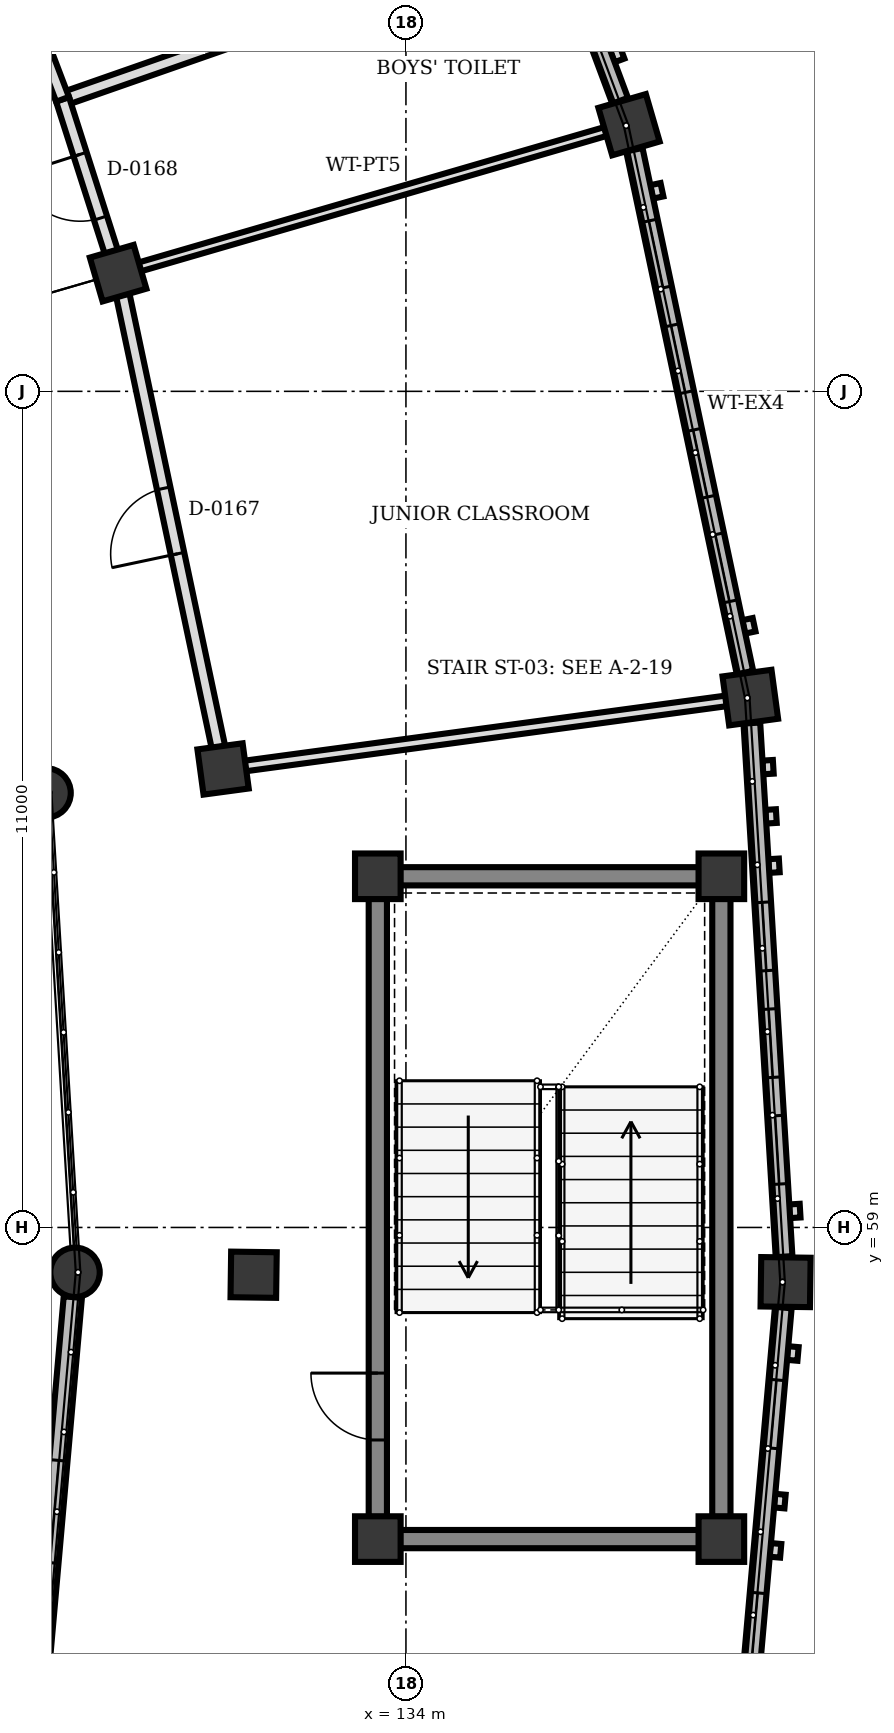
"""IFC4 building model, lengths in metres.
Left out: names, types, materials, properties, quantities, classifications, styles, units other than length and angle.
Written with IfcOpenShell. Run it as: python <this file> out.ifc"""

import sys

from ifc_helpers import new_model, si_unit, direction, frame, frame_2d, origin, origin_2d, place, context, subcontext, project, spatial, rectangle, circle, extrude, element, fill, save


model = new_model("IFC4")
c1 = context("Model", 3, precision=1e-05, world=origin(), true_north=direction((0.0, 1.0)))
c2 = subcontext(c1, "Body", "Model", "MODEL_VIEW")
j1 = project(units=[si_unit("LENGTHUNIT", "METRE"), si_unit("PLANEANGLEUNIT", "RADIAN")], contexts=[c1])
p1 = place(None, origin())
s1 = spatial("IfcSite", under=j1, at=p1, CompositionType="ELEMENT")
p2 = place(p1, origin())
s2 = spatial("IfcBuilding", under=s1, at=p2, CompositionType="ELEMENT")
p3 = place(p2, frame((0.0, 0.0, 4.5)))
s3 = spatial("IfcBuildingStorey", under=s2, at=p3, CompositionType="ELEMENT", Elevation=4.5)
for number, where, z_axis, x_axis in (
    (1, (133.63, 54.9, 0.0), (0.0, 0.0, 1.0), (1.0, 0.0, 0.0)),
    (2, (138.15, 54.9, 0.0), (0.0, 0.0, 1.0), (1.0, 0.0, 0.0)),
    (3, (138.15, 63.62, 0.0), (0.0, 0.0, 1.0), (1.0, 0.0, 0.0)),
    (4, (133.63, 63.62, 0.0), (0.0, 0.0, 1.0), (1.0, 0.0, 0.0)),
):
    element("IfcColumn", number, at=place(p3, frame(where, z_axis=z_axis, x_axis=x_axis)), inside=s3, PredefinedType="COLUMN", context=c2, shape_type="SweptSolid", body=[
        extrude(rectangle(XDim=0.6, YDim=0.6, at=origin_2d()), origin(), (0.0, 0.0, 1.0), 4.0),
    ])
for number, where, z_axis, x_axis in (
    (5, (129.646, 58.41, 0.0), (0.0, 0.0, 1.0), (1.0, 0.0, 0.0)),
    (6, (129.265, 64.717, 0.0), (0.0, 0.0, 1.0), (1.0, 0.0, 0.0)),
):
    element("IfcColumn", number, at=place(p3, frame(where, z_axis=z_axis, x_axis=x_axis)), inside=s3, PredefinedType="COLUMN", context=c2, shape_type="SweptSolid", body=[
        extrude(circle(Radius=0.325, at=origin_2d()), origin(), (0.0, 0.0, 1.0), 5.12),
    ])
for number, where, z_axis, x_axis in (
    (7, (131.996, 58.378, 0.0), (0.0, 0.0, 1.0), (1.0, -0.014, 0.0)),
    (8, (131.594, 65.032, 0.0), (0.0, 0.0, 1.0), (0.991, 0.134, 0.0)),
    (9, (130.213, 71.555, 0.0), (0.0, 0.0, 1.0), (0.96, 0.279, 0.0)),
):
    element("IfcColumn", number, at=place(p3, frame(where, z_axis=z_axis, x_axis=x_axis)), inside=s3, PredefinedType="COLUMN", context=c2, shape_type="SweptSolid", body=[
        extrude(rectangle(XDim=0.6, YDim=0.6, at=origin_2d()), origin(), (0.0, 0.0, 1.0), 4.0),
    ])
for number, where, z_axis, x_axis in (
    (10, (138.995, 58.281, 0.0), (0.0, 0.0, 1.0), (1.0, -0.014, 0.0)),
    (11, (138.531, 65.971, 0.0), (0.0, 0.0, 1.0), (0.991, 0.134, 0.0)),
    (12, (136.935, 73.508, 0.0), (0.0, 0.0, 1.0), (0.96, 0.279, 0.0)),
):
    element("IfcColumn", number, at=place(p3, frame(where, z_axis=z_axis, x_axis=x_axis)), inside=s3, PredefinedType="COLUMN", context=c2, shape_type="SweptSolid", body=[
        extrude(rectangle(XDim=0.65, YDim=0.65, at=origin_2d()), origin(), (0.0, 0.0, 1.0), 4.0),
    ])
p4 = place(p3, frame((138.965, 57.946, 0.0), z_axis=(0.0, 0.0, 1.0), x_axis=(-0.087777274836, -0.996140125696, 0.0)))
e13 = element("IfcWall", 13, at=p4, inside=s3, PredefinedType="SOLIDWALL", context=c2, shape_type="SweptSolid", body=[
    extrude(rectangle(XDim=7.031, YDim=0.22, at=frame_2d((3.516, 0.0))), origin(), (0.0, 0.0, 1.0), 3.172),
])
p5 = place(p4, frame((0.956, 0.0, 0.85)))
e14 = element("IfcOpeningElement", 14, at=p5, cuts=e13, PredefinedType="OPENING", context=c2, shape_type="SweptSolid", body=[
    extrude(rectangle(XDim=0.9, YDim=1.4, at=frame_2d((0.45, 0.7))), frame((0.0, 0.12, 0.0), z_axis=(0.0, -1.0, 0.0), x_axis=(1.0, 0.0, 0.0)), (0.0, 0.0, 1.0), 0.24),
])
p6 = place(p4, frame((3.769, 0.0, 0.85)))
e15 = element("IfcOpeningElement", 15, at=p6, cuts=e13, PredefinedType="OPENING", context=c2, shape_type="SweptSolid", body=[
    extrude(rectangle(XDim=0.9, YDim=1.4, at=frame_2d((0.45, 0.7))), frame((0.0, 0.12, 0.0), z_axis=(0.0, -1.0, 0.0), x_axis=(1.0, 0.0, 0.0)), (0.0, 0.0, 1.0), 0.24),
])
p7 = place(p4, frame((5.175, 0.0, 0.85)))
e16 = element("IfcOpeningElement", 16, at=p7, cuts=e13, PredefinedType="OPENING", context=c2, shape_type="SweptSolid", body=[
    extrude(rectangle(XDim=0.9, YDim=1.4, at=frame_2d((0.45, 0.7))), frame((0.0, 0.12, 0.0), z_axis=(0.0, -1.0, 0.0), x_axis=(1.0, 0.0, 0.0)), (0.0, 0.0, 1.0), 0.24),
])
p8 = place(p3, frame((129.12, 52.442, 0.0), z_axis=(0.0, 0.0, 1.0), x_axis=(0.087717690898, 0.996145374282, 0.0)))
e17 = element("IfcWall", 17, at=p8, inside=s3, PredefinedType="SOLIDWALL", context=c2, shape_type="SweptSolid", body=[
    extrude(rectangle(XDim=5.664, YDim=0.24, at=frame_2d((2.832, 0.0))), origin(), (0.0, 0.0, 1.0), 3.55),
])
p9 = place(p8, frame((2.157, 0.0, 0.9)))
e18 = element("IfcOpeningElement", 18, at=p9, cuts=e17, PredefinedType="OPENING", context=c2, shape_type="SweptSolid", body=[
    extrude(rectangle(XDim=1.35, YDim=1.7, at=frame_2d((0.675, 0.85))), frame((0.0, 0.13, 0.0), z_axis=(0.0, -1.0, 0.0), x_axis=(1.0, 0.0, 0.0)), (0.0, 0.0, 1.0), 0.26),
])
p10 = place(p3, frame((138.551, 65.636, 0.0), z_axis=(0.0, 0.0, 1.0), x_axis=(0.06029906372, -0.998180355905, 0.0)))
e19 = element("IfcWall", 19, at=p10, inside=s3, PredefinedType="SOLIDWALL", context=c2, shape_type="SweptSolid", body=[
    extrude(rectangle(XDim=7.033, YDim=0.22, at=frame_2d((3.516, 0.0))), origin(), (0.0, 0.0, 1.0), 3.172),
])
p11 = place(p10, frame((2.363, 0.0, 0.85)))
e20 = element("IfcOpeningElement", 20, at=p11, cuts=e19, PredefinedType="OPENING", context=c2, shape_type="SweptSolid", body=[
    extrude(rectangle(XDim=0.9, YDim=1.4, at=frame_2d((0.45, 0.7))), frame((0.0, 0.12, 0.0), z_axis=(0.0, -1.0, 0.0), x_axis=(1.0, 0.0, 0.0)), (0.0, 0.0, 1.0), 0.24),
])
p12 = place(p10, frame((3.77, 0.0, 0.85)))
e21 = element("IfcOpeningElement", 21, at=p12, cuts=e19, PredefinedType="OPENING", context=c2, shape_type="SweptSolid", body=[
    extrude(rectangle(XDim=0.9, YDim=1.4, at=frame_2d((0.45, 0.7))), frame((0.0, 0.12, 0.0), z_axis=(0.0, -1.0, 0.0), x_axis=(1.0, 0.0, 0.0)), (0.0, 0.0, 1.0), 0.24),
])
p13 = place(p10, frame((5.176, 0.0, 0.85)))
e22 = element("IfcOpeningElement", 22, at=p13, cuts=e19, PredefinedType="OPENING", context=c2, shape_type="SweptSolid", body=[
    extrude(rectangle(XDim=0.9, YDim=1.4, at=frame_2d((0.45, 0.7))), frame((0.0, 0.12, 0.0), z_axis=(0.0, -1.0, 0.0), x_axis=(1.0, 0.0, 0.0)), (0.0, 0.0, 1.0), 0.24),
])
p14 = place(p3, frame((137.005, 73.179, 0.0), z_axis=(0.0, 0.0, 1.0), x_axis=(0.207081302077, -0.978323736976, 0.0)))
e23 = element("IfcWall", 23, at=p14, inside=s3, PredefinedType="SOLIDWALL", context=c2, shape_type="SweptSolid", body=[
    extrude(rectangle(XDim=7.031, YDim=0.22, at=frame_2d((3.516, 0.0))), origin(), (0.0, 0.0, 1.0), 3.172),
])
p15 = place(p14, frame((0.956, 0.0, 0.85)))
e24 = element("IfcOpeningElement", 24, at=p15, cuts=e23, PredefinedType="OPENING", context=c2, shape_type="SweptSolid", body=[
    extrude(rectangle(XDim=0.9, YDim=1.4, at=frame_2d((0.45, 0.7))), frame((0.0, 0.12, 0.0), z_axis=(0.0, -1.0, 0.0), x_axis=(1.0, 0.0, 0.0)), (0.0, 0.0, 1.0), 0.24),
])
p16 = place(p14, frame((2.363, 0.0, 0.85)))
e25 = element("IfcOpeningElement", 25, at=p16, cuts=e23, PredefinedType="OPENING", context=c2, shape_type="SweptSolid", body=[
    extrude(rectangle(XDim=0.9, YDim=1.4, at=frame_2d((0.45, 0.7))), frame((0.0, 0.12, 0.0), z_axis=(0.0, -1.0, 0.0), x_axis=(1.0, 0.0, 0.0)), (0.0, 0.0, 1.0), 0.24),
])
p17 = place(p14, frame((3.769, 0.0, 0.85)))
e26 = element("IfcOpeningElement", 26, at=p17, cuts=e23, PredefinedType="OPENING", context=c2, shape_type="SweptSolid", body=[
    extrude(rectangle(XDim=0.9, YDim=1.4, at=frame_2d((0.45, 0.7))), frame((0.0, 0.12, 0.0), z_axis=(0.0, -1.0, 0.0), x_axis=(1.0, 0.0, 0.0)), (0.0, 0.0, 1.0), 0.24),
])
p18 = place(p14, frame((5.175, 0.0, 0.85)))
e27 = element("IfcOpeningElement", 27, at=p18, cuts=e23, PredefinedType="OPENING", context=c2, shape_type="SweptSolid", body=[
    extrude(rectangle(XDim=0.9, YDim=1.4, at=frame_2d((0.45, 0.7))), frame((0.0, 0.12, 0.0), z_axis=(0.0, -1.0, 0.0), x_axis=(1.0, 0.0, 0.0)), (0.0, 0.0, 1.0), 0.24),
])
p19 = place(p3, frame((134.361, 80.411, 0.0), z_axis=(0.0, 0.0, 1.0), x_axis=(0.349448583385, -0.936955541939, 0.0)))
e28 = element("IfcWall", 28, at=p19, inside=s3, PredefinedType="SOLIDWALL", context=c2, shape_type="SweptSolid", body=[
    extrude(rectangle(XDim=7.031, YDim=0.22, at=frame_2d((3.516, 0.0))), origin(), (0.0, 0.0, 1.0), 3.172),
])
p20 = place(p19, frame((0.584, 0.0, 1.15)))
e29 = element("IfcOpeningElement", 29, at=p20, cuts=e28, PredefinedType="OPENING", context=c2, shape_type="SweptSolid", body=[
    extrude(rectangle(XDim=0.8, YDim=1.1, at=frame_2d((0.4, 0.55))), frame((0.0, 0.12, 0.0), z_axis=(0.0, -1.0, 0.0), x_axis=(1.0, 0.0, 0.0)), (0.0, 0.0, 1.0), 0.24),
])
p21 = place(p19, frame((2.834, 0.0, 1.15)))
e30 = element("IfcOpeningElement", 30, at=p21, cuts=e28, PredefinedType="OPENING", context=c2, shape_type="SweptSolid", body=[
    extrude(rectangle(XDim=0.8, YDim=1.1, at=frame_2d((0.4, 0.55))), frame((0.0, 0.12, 0.0), z_axis=(0.0, -1.0, 0.0), x_axis=(1.0, 0.0, 0.0)), (0.0, 0.0, 1.0), 0.24),
])
p22 = place(p19, frame((5.366, 0.0, 1.15)))
e31 = element("IfcOpeningElement", 31, at=p22, cuts=e28, PredefinedType="OPENING", context=c2, shape_type="SweptSolid", body=[
    extrude(rectangle(XDim=0.8, YDim=1.1, at=frame_2d((0.4, 0.55))), frame((0.0, 0.12, 0.0), z_axis=(0.0, -1.0, 0.0), x_axis=(1.0, 0.0, 0.0)), (0.0, 0.0, 1.0), 0.24),
])
p23 = place(p3, frame((133.63, 55.192, 0.0), z_axis=(0.0, 0.0, 1.0), x_axis=(0.0, 1.0, 0.0)))
e32 = element("IfcWall", 32, at=p23, inside=s3, PredefinedType="SHEAR", context=c2, shape_type="SweptSolid", body=[
    extrude(rectangle(XDim=8.136, YDim=0.24, at=frame_2d((4.068, 0.0))), origin(), (0.0, 0.0, 1.0), 3.74),
])
p24 = place(p23, frame((1.012, 0.0, 0.0)))
e33 = element("IfcOpeningElement", 33, at=p24, cuts=e32, PredefinedType="OPENING", context=c2, shape_type="SweptSolid", body=[
    extrude(rectangle(XDim=0.88, YDim=2.1, at=frame_2d((0.44, 1.05))), frame((0.0, 0.13, 0.0), z_axis=(0.0, -1.0, 0.0), x_axis=(1.0, 0.0, 0.0)), (0.0, 0.0, 1.0), 0.26),
])
p25 = place(p3, frame((138.15, 63.328, 0.0), z_axis=(0.0, 0.0, 1.0), x_axis=(0.0, -1.0, 0.0)))
e34 = element("IfcWall", 34, at=p25, inside=s3, PredefinedType="SHEAR", context=c2, shape_type="SweptSolid", body=[
    extrude(rectangle(XDim=8.136, YDim=0.24, at=frame_2d((4.068, 0.0))), origin(), (0.0, 0.0, 1.0), 3.74),
])
for number, where, z_axis, x_axis in (
    (35, (137.858, 54.9, 0.0), (0.0, 0.0, 1.0), (-1.0, 0.0, 0.0)),
    (36, (137.858, 63.62, 0.0), (0.0, 0.0, 1.0), (-1.0, 0.0, 0.0)),
):
    element("IfcWall", number, at=place(p3, frame(where, z_axis=z_axis, x_axis=x_axis)), inside=s3, PredefinedType="SHEAR", context=c2, shape_type="SweptSolid", body=[
        extrude(rectangle(XDim=3.936, YDim=0.24, at=frame_2d((1.968, 0.0))), origin(), (0.0, 0.0, 1.0), 3.74),
    ])
p26 = place(p3, frame((131.883, 65.071, 0.0), z_axis=(0.0, 0.0, 1.0), x_axis=(0.990971868219, 0.134069968295, 0.0)))
e37 = element("IfcWall", 37, at=p26, inside=s3, PredefinedType="PARTITIONING", context=c2, shape_type="SweptSolid", body=[
    extrude(rectangle(XDim=6.392, YDim=0.14, at=frame_2d((3.196, 0.0))), origin(), (0.0, 0.0, 1.0), 3.072),
])
p27 = place(p3, frame((130.493, 71.636, 0.0), z_axis=(0.0, 0.0, 1.0), x_axis=(0.960267345013, 0.279081755231, 0.0)))
e38 = element("IfcWall", 38, at=p27, inside=s3, PredefinedType="PARTITIONING", context=c2, shape_type="SweptSolid", body=[
    extrude(rectangle(XDim=6.392, YDim=0.12, at=frame_2d((3.196, 0.0))), origin(), (0.0, 0.0, 1.0), 3.072),
])
p28 = place(p3, frame((129.482, 73.842, 0.0), z_axis=(0.0, 0.0, 1.0), x_axis=(0.944038525113, 0.329835205979, 0.0)))
e39 = element("IfcWall", 39, at=p28, inside=s3, PredefinedType="PARTITIONING", context=c2, shape_type="SweptSolid", body=[
    extrude(rectangle(XDim=6.755, YDim=0.18, at=frame_2d((3.377, 0.0))), origin(), (0.0, 0.0, 1.0), 3.072),
])
p29 = place(p3, frame((131.533, 65.318, 0.0), z_axis=(0.0, 0.0, 1.0), x_axis=(-0.206987404473, 0.978343607527, 0.0)))
e40 = element("IfcWall", 40, at=p29, inside=s3, PredefinedType="PARTITIONING", context=c2, shape_type="SweptSolid", body=[
    extrude(rectangle(XDim=6.083, YDim=0.18, at=frame_2d((3.042, 0.0))), origin(), (0.0, 0.0, 1.0), 3.072),
])
p30 = place(p29, frame((2.601, 0.0, 0.0)))
e41 = element("IfcOpeningElement", 41, at=p30, cuts=e40, PredefinedType="OPENING", context=c2, shape_type="SweptSolid", body=[
    extrude(rectangle(XDim=0.88, YDim=2.1, at=frame_2d((0.44, 1.05))), frame((0.0, 0.1, 0.0), z_axis=(0.0, -1.0, 0.0), x_axis=(1.0, 0.0, 0.0)), (0.0, 0.0, 1.0), 0.2),
])
p31 = place(p3, frame((130.124, 71.833, 0.0), z_axis=(0.0, 0.0, 1.0), x_axis=(-0.304431303169, 0.952534294212, 0.0)))
e42 = element("IfcWall", 42, at=p31, inside=s3, PredefinedType="PARTITIONING", context=c2, shape_type="SweptSolid", body=[
    extrude(rectangle(XDim=2.109, YDim=0.18, at=frame_2d((1.055, 0.0))), origin(), (0.0, 0.0, 1.0), 3.072),
])
p32 = place(p31, frame((0.469, 0.0, 0.0)))
e43 = element("IfcOpeningElement", 43, at=p32, cuts=e42, PredefinedType="OPENING", context=c2, shape_type="SweptSolid", body=[
    extrude(rectangle(XDim=0.88, YDim=2.1, at=frame_2d((0.44, 1.05))), frame((0.0, 0.1, 0.0), z_axis=(0.0, -1.0, 0.0), x_axis=(1.0, 0.0, 0.0)), (0.0, 0.0, 1.0), 0.2),
])
p33 = place(p3, frame((129.482, 73.842, 0.0), z_axis=(0.0, 0.0, 1.0), x_axis=(-0.35507389875, 0.934838235432, 0.0)))
e44 = element("IfcWall", 44, at=p33, inside=s3, PredefinedType="PARTITIONING", context=c2, shape_type="SweptSolid", body=[
    extrude(rectangle(XDim=2.402, YDim=0.18, at=frame_2d((1.201, 0.0))), origin(), (0.0, 0.0, 1.0), 3.072),
])
p34 = place(p33, frame((0.761, 0.0, 0.0)))
e45 = element("IfcOpeningElement", 45, at=p34, cuts=e44, PredefinedType="OPENING", context=c2, shape_type="SweptSolid", body=[
    extrude(rectangle(XDim=0.88, YDim=2.1, at=frame_2d((0.44, 1.05))), frame((0.0, 0.1, 0.0), z_axis=(0.0, -1.0, 0.0), x_axis=(1.0, 0.0, 0.0)), (0.0, 0.0, 1.0), 0.2),
])
p35 = place(p5, origin())
e46 = element("IfcWindow", 46, at=p35, inside=s3, PartitioningType="SINGLE_PANEL", PredefinedType="WINDOW", context=c2, shape_type="SweptSolid", body=[
    extrude(rectangle(XDim=0.9, YDim=1.4, at=frame_2d((0.45, 0.7))), frame((0.0, 0.03, 0.0), z_axis=(0.0, -1.0, 0.0), x_axis=(1.0, 0.0, 0.0)), (0.0, 0.0, 1.0), 0.06),
])
fill(e14, e46)
p36 = place(p6, origin())
e47 = element("IfcWindow", 47, at=p36, inside=s3, PartitioningType="SINGLE_PANEL", PredefinedType="WINDOW", context=c2, shape_type="SweptSolid", body=[
    extrude(rectangle(XDim=0.9, YDim=1.4, at=frame_2d((0.45, 0.7))), frame((0.0, 0.03, 0.0), z_axis=(0.0, -1.0, 0.0), x_axis=(1.0, 0.0, 0.0)), (0.0, 0.0, 1.0), 0.06),
])
fill(e15, e47)
p37 = place(p9, origin())
e48 = element("IfcWindow", 48, at=p37, inside=s3, PartitioningType="SINGLE_PANEL", PredefinedType="WINDOW", context=c2, shape_type="SweptSolid", body=[
    extrude(rectangle(XDim=1.35, YDim=1.7, at=frame_2d((0.675, 0.85))), frame((0.0, 0.03, 0.0), z_axis=(0.0, -1.0, 0.0), x_axis=(1.0, 0.0, 0.0)), (0.0, 0.0, 1.0), 0.06),
])
fill(e18, e48)
p38 = place(p11, origin())
e49 = element("IfcWindow", 49, at=p38, inside=s3, PartitioningType="SINGLE_PANEL", PredefinedType="WINDOW", context=c2, shape_type="SweptSolid", body=[
    extrude(rectangle(XDim=0.9, YDim=1.4, at=frame_2d((0.45, 0.7))), frame((0.0, 0.03, 0.0), z_axis=(0.0, -1.0, 0.0), x_axis=(1.0, 0.0, 0.0)), (0.0, 0.0, 1.0), 0.06),
])
fill(e20, e49)
p39 = place(p12, origin())
e50 = element("IfcWindow", 50, at=p39, inside=s3, PartitioningType="SINGLE_PANEL", PredefinedType="WINDOW", context=c2, shape_type="SweptSolid", body=[
    extrude(rectangle(XDim=0.9, YDim=1.4, at=frame_2d((0.45, 0.7))), frame((0.0, 0.03, 0.0), z_axis=(0.0, -1.0, 0.0), x_axis=(1.0, 0.0, 0.0)), (0.0, 0.0, 1.0), 0.06),
])
fill(e21, e50)
p40 = place(p13, origin())
e51 = element("IfcWindow", 51, at=p40, inside=s3, PartitioningType="SINGLE_PANEL", PredefinedType="WINDOW", context=c2, shape_type="SweptSolid", body=[
    extrude(rectangle(XDim=0.9, YDim=1.4, at=frame_2d((0.45, 0.7))), frame((0.0, 0.03, 0.0), z_axis=(0.0, -1.0, 0.0), x_axis=(1.0, 0.0, 0.0)), (0.0, 0.0, 1.0), 0.06),
])
fill(e22, e51)
p41 = place(p15, origin())
e52 = element("IfcWindow", 52, at=p41, inside=s3, PartitioningType="SINGLE_PANEL", PredefinedType="WINDOW", context=c2, shape_type="SweptSolid", body=[
    extrude(rectangle(XDim=0.9, YDim=1.4, at=frame_2d((0.45, 0.7))), frame((0.0, 0.03, 0.0), z_axis=(0.0, -1.0, 0.0), x_axis=(1.0, 0.0, 0.0)), (0.0, 0.0, 1.0), 0.06),
])
fill(e24, e52)
p42 = place(p16, origin())
e53 = element("IfcWindow", 53, at=p42, inside=s3, PartitioningType="SINGLE_PANEL", PredefinedType="WINDOW", context=c2, shape_type="SweptSolid", body=[
    extrude(rectangle(XDim=0.9, YDim=1.4, at=frame_2d((0.45, 0.7))), frame((0.0, 0.03, 0.0), z_axis=(0.0, -1.0, 0.0), x_axis=(1.0, 0.0, 0.0)), (0.0, 0.0, 1.0), 0.06),
])
fill(e25, e53)
p43 = place(p17, origin())
e54 = element("IfcWindow", 54, at=p43, inside=s3, PartitioningType="SINGLE_PANEL", PredefinedType="WINDOW", context=c2, shape_type="SweptSolid", body=[
    extrude(rectangle(XDim=0.9, YDim=1.4, at=frame_2d((0.45, 0.7))), frame((0.0, 0.03, 0.0), z_axis=(0.0, -1.0, 0.0), x_axis=(1.0, 0.0, 0.0)), (0.0, 0.0, 1.0), 0.06),
])
fill(e26, e54)
p44 = place(p18, origin())
e55 = element("IfcWindow", 55, at=p44, inside=s3, PartitioningType="SINGLE_PANEL", PredefinedType="WINDOW", context=c2, shape_type="SweptSolid", body=[
    extrude(rectangle(XDim=0.9, YDim=1.4, at=frame_2d((0.45, 0.7))), frame((0.0, 0.03, 0.0), z_axis=(0.0, -1.0, 0.0), x_axis=(1.0, 0.0, 0.0)), (0.0, 0.0, 1.0), 0.06),
])
fill(e27, e55)
p45 = place(p24, origin())
e56 = element("IfcDoor", 56, at=p45, inside=s3, OperationType="SINGLE_SWING_RIGHT", PredefinedType="DOOR", context=c2, shape_type="SweptSolid", body=[
    extrude(rectangle(XDim=0.88, YDim=2.1, at=frame_2d((0.44, 1.05))), frame((0.0, 0.025, 0.0), z_axis=(0.0, -1.0, 0.0), x_axis=(1.0, 0.0, 0.0)), (0.0, 0.0, 1.0), 0.05),
])
fill(e33, e56)
p46 = place(p30, origin())
e57 = element("IfcDoor", 57, at=p46, inside=s3, OperationType="SINGLE_SWING_LEFT", PredefinedType="DOOR", context=c2, shape_type="SweptSolid", body=[
    extrude(rectangle(XDim=0.88, YDim=2.1, at=frame_2d((0.44, 1.05))), frame((0.0, 0.025, 0.0), z_axis=(0.0, -1.0, 0.0), x_axis=(1.0, 0.0, 0.0)), (0.0, 0.0, 1.0), 0.05),
])
fill(e41, e57)
p47 = place(p32, origin())
e58 = element("IfcDoor", 58, at=p47, inside=s3, OperationType="SINGLE_SWING_RIGHT", PredefinedType="DOOR", context=c2, shape_type="SweptSolid", body=[
    extrude(rectangle(XDim=0.88, YDim=2.1, at=frame_2d((0.44, 1.05))), frame((0.0, 0.025, 0.0), z_axis=(0.0, -1.0, 0.0), x_axis=(1.0, 0.0, 0.0)), (0.0, 0.0, 1.0), 0.05),
])
fill(e43, e58)
save(model, sys.argv[1])
